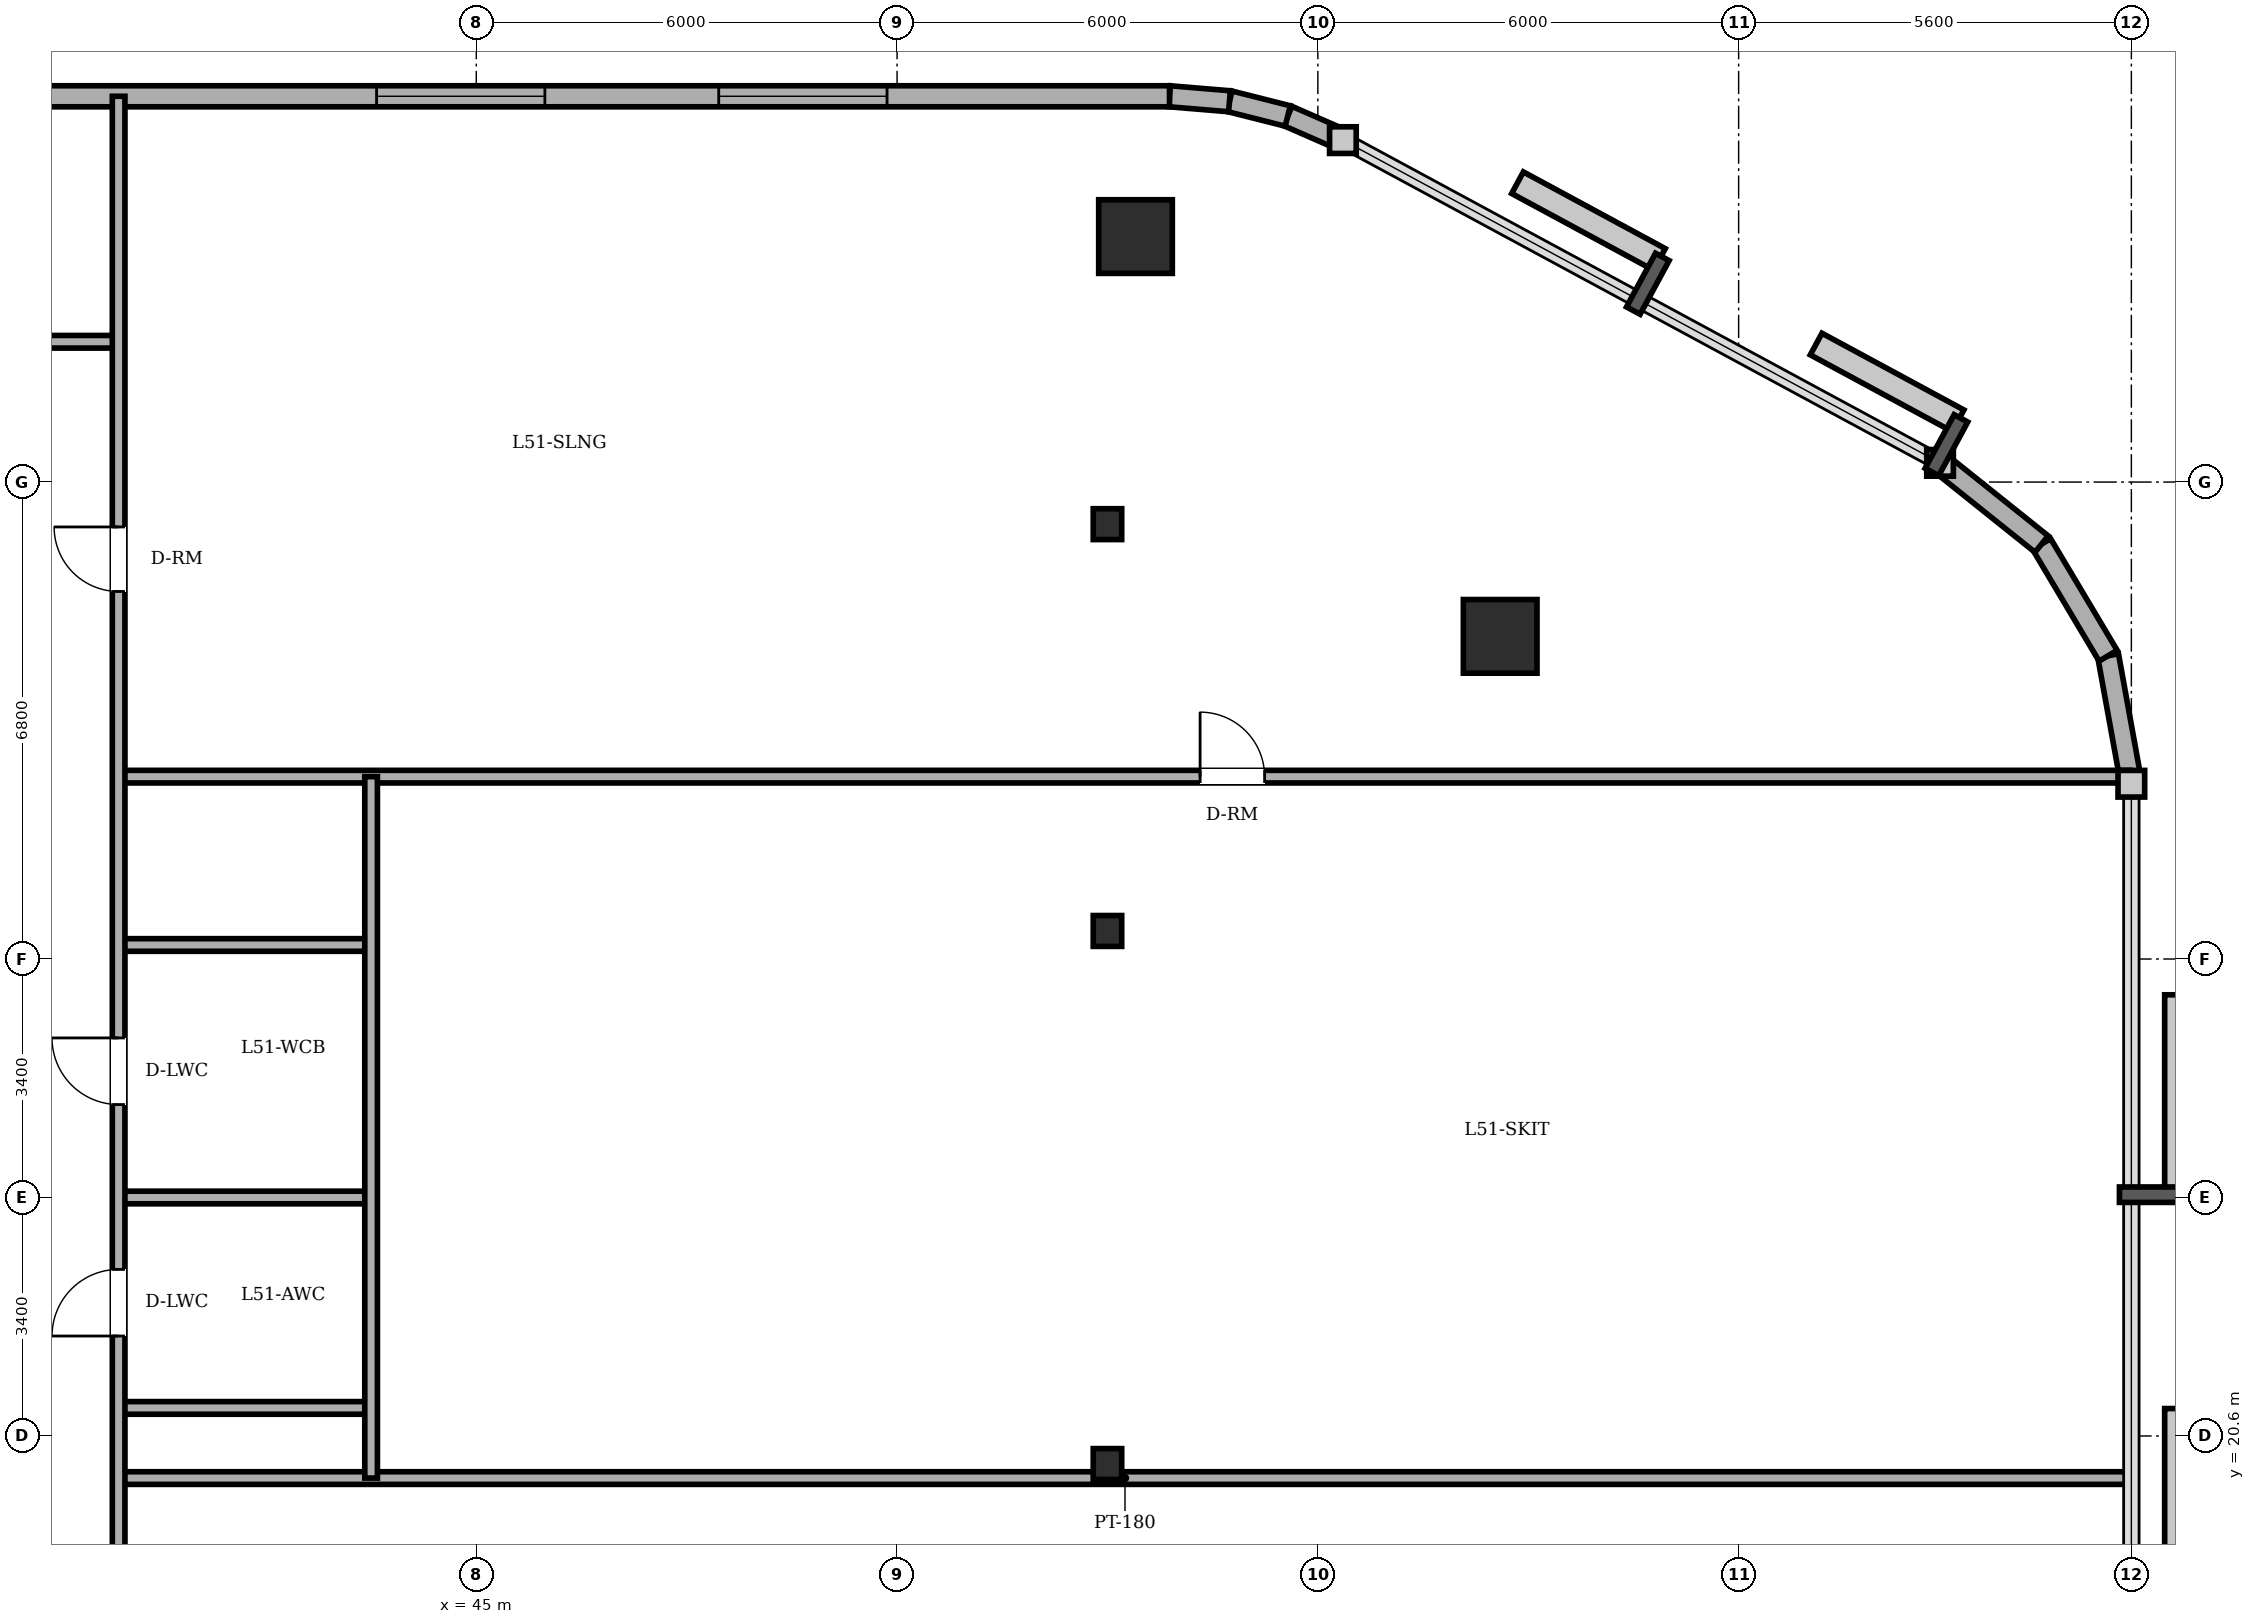
"""IFC4 building model, lengths in metres.
Left out: names, types, materials, properties, quantities, classifications, styles, units other than length and angle.
Written with IfcOpenShell. Run it as: python <this file> out.ifc"""

import sys

from ifc_helpers import new_model, si_unit, direction, frame, frame_2d, origin, origin_2d, place, context, subcontext, project, spatial, rectangle, circle, i_section, extrude, element, fill, save


model = new_model("IFC4")
c1 = context("Model", 3, precision=1e-05, world=origin(), true_north=direction((0.0, 1.0)))
c2 = subcontext(c1, "Body", "Model", "MODEL_VIEW")
j1 = project(units=[si_unit("LENGTHUNIT", "METRE"), si_unit("PLANEANGLEUNIT", "RADIAN")], contexts=[c1])
p1 = place(None, origin())
s1 = spatial("IfcSite", under=j1, at=p1, CompositionType="ELEMENT")
p2 = place(p1, origin())
s2 = spatial("IfcBuilding", under=s1, at=p2, CompositionType="ELEMENT")
p3 = place(p2, frame((0.0, 0.0, 196.2)))
s3 = spatial("IfcBuildingStorey", under=s2, at=p3, CompositionType="ELEMENT", Elevation=196.2)
for number, where, z_axis, x_axis in (
    (1, (59.6, 32.0, 0.0), (0.0, 0.0, 1.0), (1.0, 0.0, 0.0)),
    (2, (54.4, 37.7, 0.0), (0.0, 0.0, 1.0), (1.0, 0.0, 0.0)),
):
    element("IfcColumn", number, at=place(p3, frame(where, z_axis=z_axis, x_axis=x_axis)), inside=s3, PredefinedType="COLUMN", context=c2, shape_type="SweptSolid", body=[
        extrude(circle(Radius=0.525, at=origin_2d()), origin(), (0.0, 0.0, 1.0), 5.1),
    ])
for number, where, z_axis, x_axis in (
    (3, (54.0, 20.2, 0.0), (0.0, 0.0, 1.0), (1.0, 0.0, 0.0)),
    (4, (54.0, 27.8, 0.0), (0.0, 0.0, 1.0), (1.0, 0.0, 0.0)),
    (5, (54.0, 33.6, 0.0), (0.0, 0.0, 1.0), (1.0, 0.0, 0.0)),
):
    element("IfcColumn", number, at=place(p3, frame(where, z_axis=z_axis, x_axis=x_axis)), inside=s3, PredefinedType="COLUMN", context=c2, shape_type="SweptSolid", body=[
        extrude(i_section(OverallWidth=0.406, OverallDepth=0.44, WebThickness=0.024, FlangeThickness=0.039, FilletRadius=0.015, at=origin_2d()), origin(), (0.0, 0.0, 1.0), 5.1),
    ])
p4 = place(p3, frame((68.6, 29.899, 0.0), z_axis=(0.0, 0.0, 1.0), x_axis=(-0.178468469252, 0.983945631365, 0.0)))
e6 = element("IfcWall", 6, at=p4, inside=s3, PredefinedType="SOLIDWALL", context=c2, shape_type="SweptSolid", body=[
    extrude(rectangle(XDim=1.855, YDim=0.3, at=frame_2d((0.927, 0.0))), origin(), (0.0, 0.0, 1.0), 4.9),
])
p5 = place(p3, frame((68.269, 31.724, 0.0), z_axis=(0.0, 0.0, 1.0), x_axis=(-0.512072018927, 0.858942516955, 0.0)))
e7 = element("IfcWall", 7, at=p5, inside=s3, PredefinedType="SOLIDWALL", context=c2, shape_type="SweptSolid", body=[
    extrude(rectangle(XDim=1.853, YDim=0.3, at=frame_2d((0.927, 0.0))), origin(), (0.0, 0.0, 1.0), 4.9),
])
p6 = place(p3, frame((67.32, 33.316, 0.0), z_axis=(0.0, 0.0, 1.0), x_axis=(-0.780920189257, 0.624630817372, 0.0)))
e8 = element("IfcWall", 8, at=p6, inside=s3, PredefinedType="SOLIDWALL", context=c2, shape_type="SweptSolid", body=[
    extrude(rectangle(XDim=1.854, YDim=0.3, at=frame_2d((0.927, 0.0))), origin(), (0.0, 0.0, 1.0), 4.9),
])
p7 = place(p3, frame((57.357, 39.075, 0.0), z_axis=(0.0, 0.0, 1.0), x_axis=(-0.916085473636, 0.400983048261, 0.0)))
e9 = element("IfcWall", 9, at=p7, inside=s3, PredefinedType="SOLIDWALL", context=c2, shape_type="SweptSolid", body=[
    extrude(rectangle(XDim=0.858, YDim=0.3, at=frame_2d((0.429, 0.0))), origin(), (0.0, 0.0, 1.0), 4.9),
])
p8 = place(p3, frame((56.571, 39.419, 0.0), z_axis=(0.0, 0.0, 1.0), x_axis=(-0.969536346338, 0.244947490555, 0.0)))
e10 = element("IfcWall", 10, at=p8, inside=s3, PredefinedType="SOLIDWALL", context=c2, shape_type="SweptSolid", body=[
    extrude(rectangle(XDim=0.857, YDim=0.3, at=frame_2d((0.429, 0.0))), origin(), (0.0, 0.0, 1.0), 4.9),
])
p9 = place(p3, frame((55.74, 39.629, 0.0), z_axis=(0.0, 0.0, 1.0), x_axis=(-0.996565355958, 0.082809971041, 0.0)))
e11 = element("IfcWall", 11, at=p9, inside=s3, PredefinedType="SOLIDWALL", context=c2, shape_type="SweptSolid", body=[
    extrude(rectangle(XDim=0.858, YDim=0.3, at=frame_2d((0.429, 0.0))), origin(), (0.0, 0.0, 1.0), 4.9),
])
p10 = place(p3, frame((54.885, 39.7, 0.0), z_axis=(0.0, 0.0, 1.0), x_axis=(-1.0, 0.0, 0.0)))
e12 = element("IfcWall", 12, at=p10, inside=s3, PredefinedType="SOLIDWALL", context=c2, shape_type="SweptSolid", body=[
    extrude(rectangle(XDim=32.485, YDim=0.3, at=frame_2d((16.243, 0.0))), origin(), (0.0, 0.0, 1.0), 4.9),
])
p11 = place(p10, frame((23.36, 0.0, 0.0)))
e13 = element("IfcOpeningElement", 13, at=p11, cuts=e12, PredefinedType="OPENING", context=c2, shape_type="SweptSolid", body=[
    extrude(rectangle(XDim=0.95, YDim=2.2, at=frame_2d((0.475, 1.1))), frame((0.0, 0.16, 0.0), z_axis=(0.0, -1.0, 0.0), x_axis=(1.0, 0.0, 0.0)), (0.0, 0.0, 1.0), 0.32),
])
p12 = place(p10, frame((4.028, 0.0, 0.85)))
e14 = element("IfcOpeningElement", 14, at=p12, cuts=e12, PredefinedType="OPENING", context=c2, shape_type="SweptSolid", body=[
    extrude(rectangle(XDim=2.4, YDim=2.1, at=frame_2d((1.2, 1.05))), frame((0.0, 0.16, 0.0), z_axis=(0.0, -1.0, 0.0), x_axis=(1.0, 0.0, 0.0)), (0.0, 0.0, 1.0), 0.32),
])
p13 = place(p10, frame((8.907, 0.0, 0.85)))
e15 = element("IfcOpeningElement", 15, at=p13, cuts=e12, PredefinedType="OPENING", context=c2, shape_type="SweptSolid", body=[
    extrude(rectangle(XDim=2.4, YDim=2.1, at=frame_2d((1.2, 1.05))), frame((0.0, 0.16, 0.0), z_axis=(0.0, -1.0, 0.0), x_axis=(1.0, 0.0, 0.0)), (0.0, 0.0, 1.0), 0.32),
])
p14 = place(p10, frame((19.502, 0.0, 0.85)))
e16 = element("IfcOpeningElement", 16, at=p14, cuts=e12, PredefinedType="OPENING", context=c2, shape_type="SweptSolid", body=[
    extrude(rectangle(XDim=2.4, YDim=2.1, at=frame_2d((1.2, 1.05))), frame((0.0, 0.16, 0.0), z_axis=(0.0, -1.0, 0.0), x_axis=(1.0, 0.0, 0.0)), (0.0, 0.0, 1.0), 0.32),
])
p15 = place(p10, frame((25.218, 0.0, 0.85)))
e17 = element("IfcOpeningElement", 17, at=p15, cuts=e12, PredefinedType="OPENING", context=c2, shape_type="SweptSolid", body=[
    extrude(rectangle(XDim=2.4, YDim=2.1, at=frame_2d((1.2, 1.05))), frame((0.0, 0.16, 0.0), z_axis=(0.0, -1.0, 0.0), x_axis=(1.0, 0.0, 0.0)), (0.0, 0.0, 1.0), 0.32),
])
p16 = place(p3, frame((39.9, 20.0, 0.0), z_axis=(0.0, 0.0, 1.0), x_axis=(1.0, 0.0, 0.0)))
e18 = element("IfcWall", 18, at=p16, inside=s3, PredefinedType="PARTITIONING", context=c2, shape_type="SweptSolid", body=[
    extrude(rectangle(XDim=28.7, YDim=0.18, at=frame_2d((14.35, 0.0))), origin(), (0.0, 0.0, 1.0), 4.482),
])
p17 = place(p3, frame((39.9, 21.0, 0.0), z_axis=(0.0, 0.0, 1.0), x_axis=(1.0, 0.0, 0.0)))
e19 = element("IfcWall", 19, at=p17, inside=s3, PredefinedType="PARTITIONING", context=c2, shape_type="SweptSolid", body=[
    extrude(rectangle(XDim=3.6, YDim=0.18, at=frame_2d((1.8, 0.0))), origin(), (0.0, 0.0, 1.0), 4.9),
])
p18 = place(p3, frame((39.9, 24.0, 0.0), z_axis=(0.0, 0.0, 1.0), x_axis=(1.0, 0.0, 0.0)))
e20 = element("IfcWall", 20, at=p18, inside=s3, PredefinedType="PARTITIONING", context=c2, shape_type="SweptSolid", body=[
    extrude(rectangle(XDim=3.6, YDim=0.18, at=frame_2d((1.8, 0.0))), origin(), (0.0, 0.0, 1.0), 4.682),
])
p19 = place(p3, frame((39.9, 27.6, 0.0), z_axis=(0.0, 0.0, 1.0), x_axis=(1.0, 0.0, 0.0)))
e21 = element("IfcWall", 21, at=p19, inside=s3, PredefinedType="PARTITIONING", context=c2, shape_type="SweptSolid", body=[
    extrude(rectangle(XDim=3.6, YDim=0.18, at=frame_2d((1.8, 0.0))), origin(), (0.0, 0.0, 1.0), 4.482),
])
p20 = place(p3, frame((39.9, 30.0, 0.0), z_axis=(0.0, 0.0, 1.0), x_axis=(1.0, 0.0, 0.0)))
e22 = element("IfcWall", 22, at=p20, inside=s3, PredefinedType="PARTITIONING", context=c2, shape_type="SweptSolid", body=[
    extrude(rectangle(XDim=28.682, YDim=0.18, at=frame_2d((14.341, 0.0))), origin(), (0.0, 0.0, 1.0), 4.9),
])
p21 = place(p20, frame((15.421, 0.0, 0.0)))
e23 = element("IfcOpeningElement", 23, at=p21, cuts=e22, PredefinedType="OPENING", context=c2, shape_type="SweptSolid", body=[
    extrude(rectangle(XDim=0.92, YDim=2.1, at=frame_2d((0.46, 1.05))), frame((0.0, 0.1, 0.0), z_axis=(0.0, -1.0, 0.0), x_axis=(1.0, 0.0, 0.0)), (0.0, 0.0, 1.0), 0.2),
])
p22 = place(p3, frame((17.656, 36.2, 0.0), z_axis=(0.0, 0.0, 1.0), x_axis=(1.0, 0.0, 0.0)))
e24 = element("IfcWall", 24, at=p22, inside=s3, PredefinedType="PARTITIONING", context=c2, shape_type="SweptSolid", body=[
    extrude(rectangle(XDim=22.244, YDim=0.18, at=frame_2d((11.122, 0.0))), origin(), (0.0, 0.0, 1.0), 4.9),
])
p23 = place(p3, frame((39.9, 8.3, 0.0), z_axis=(0.0, 0.0, 1.0), x_axis=(0.0, 1.0, 0.0)))
e25 = element("IfcWall", 25, at=p23, inside=s3, PredefinedType="PARTITIONING", context=c2, shape_type="SweptSolid", body=[
    extrude(rectangle(XDim=31.4, YDim=0.18, at=frame_2d((15.7, 0.0))), origin(), (0.0, 0.0, 1.0), 4.9),
])
p24 = place(p23, frame((13.725, 0.0, 0.0)))
e26 = element("IfcOpeningElement", 26, at=p24, cuts=e25, PredefinedType="OPENING", context=c2, shape_type="SweptSolid", body=[
    extrude(rectangle(XDim=0.95, YDim=2.15, at=frame_2d((0.475, 1.075))), frame((0.0, 0.1, 0.0), z_axis=(0.0, -1.0, 0.0), x_axis=(1.0, 0.0, 0.0)), (0.0, 0.0, 1.0), 0.2),
])
p25 = place(p23, frame((17.025, 0.0, 0.0)))
e27 = element("IfcOpeningElement", 27, at=p25, cuts=e25, PredefinedType="OPENING", context=c2, shape_type="SweptSolid", body=[
    extrude(rectangle(XDim=0.95, YDim=2.15, at=frame_2d((0.475, 1.075))), frame((0.0, 0.1, 0.0), z_axis=(0.0, -1.0, 0.0), x_axis=(1.0, 0.0, 0.0)), (0.0, 0.0, 1.0), 0.2),
])
p26 = place(p23, frame((24.34, 0.0, 0.0)))
e28 = element("IfcOpeningElement", 28, at=p26, cuts=e25, PredefinedType="OPENING", context=c2, shape_type="SweptSolid", body=[
    extrude(rectangle(XDim=0.92, YDim=2.1, at=frame_2d((0.46, 1.05))), frame((0.0, 0.1, 0.0), z_axis=(0.0, -1.0, 0.0), x_axis=(1.0, 0.0, 0.0)), (0.0, 0.0, 1.0), 0.2),
])
p27 = place(p23, frame((7.14, 0.0, 0.0)))
e29 = element("IfcOpeningElement", 29, at=p27, cuts=e25, PredefinedType="OPENING", context=c2, shape_type="SweptSolid", body=[
    extrude(rectangle(XDim=0.92, YDim=2.1, at=frame_2d((0.46, 1.05))), frame((0.0, 0.1, 0.0), z_axis=(0.0, -1.0, 0.0), x_axis=(1.0, 0.0, 0.0)), (0.0, 0.0, 1.0), 0.2),
])
p28 = place(p3, frame((43.5, 20.0, 0.0), z_axis=(0.0, 0.0, 1.0), x_axis=(0.0, 1.0, 0.0)))
e30 = element("IfcWall", 30, at=p28, inside=s3, PredefinedType="PARTITIONING", context=c2, shape_type="SweptSolid", body=[
    extrude(rectangle(XDim=10.0, YDim=0.18, at=frame_2d((5.0, 0.0))), origin(), (0.0, 0.0, 1.0), 4.9),
])
p29 = place(p12, origin())
e31 = element("IfcWindow", 31, at=p29, inside=s3, PartitioningType="TRIPLE_PANEL_VERTICAL", PredefinedType="WINDOW", context=c2, shape_type="SweptSolid", body=[
    extrude(rectangle(XDim=2.4, YDim=2.1, at=frame_2d((1.2, 1.05))), frame((0.0, 0.03, 0.0), z_axis=(0.0, -1.0, 0.0), x_axis=(1.0, 0.0, 0.0)), (0.0, 0.0, 1.0), 0.06),
])
fill(e14, e31)
p30 = place(p13, origin())
e32 = element("IfcWindow", 32, at=p30, inside=s3, PartitioningType="TRIPLE_PANEL_VERTICAL", PredefinedType="WINDOW", context=c2, shape_type="SweptSolid", body=[
    extrude(rectangle(XDim=2.4, YDim=2.1, at=frame_2d((1.2, 1.05))), frame((0.0, 0.03, 0.0), z_axis=(0.0, -1.0, 0.0), x_axis=(1.0, 0.0, 0.0)), (0.0, 0.0, 1.0), 0.06),
])
fill(e15, e32)
p31 = place(p24, origin())
e33 = element("IfcDoor", 33, at=p31, inside=s3, OperationType="SINGLE_SWING_LEFT", PredefinedType="DOOR", context=c2, shape_type="SweptSolid", body=[
    extrude(rectangle(XDim=0.95, YDim=2.15, at=frame_2d((0.475, 1.075))), frame((0.0, 0.025, 0.0), z_axis=(0.0, -1.0, 0.0), x_axis=(1.0, 0.0, 0.0)), (0.0, 0.0, 1.0), 0.05),
])
fill(e26, e33)
p32 = place(p25, origin())
e34 = element("IfcDoor", 34, at=p32, inside=s3, OperationType="SINGLE_SWING_RIGHT", PredefinedType="DOOR", context=c2, shape_type="SweptSolid", body=[
    extrude(rectangle(XDim=0.95, YDim=2.15, at=frame_2d((0.475, 1.075))), frame((0.0, 0.025, 0.0), z_axis=(0.0, -1.0, 0.0), x_axis=(1.0, 0.0, 0.0)), (0.0, 0.0, 1.0), 0.05),
])
fill(e27, e34)
p33 = place(p26, origin())
e35 = element("IfcDoor", 35, at=p33, inside=s3, OperationType="SINGLE_SWING_RIGHT", PredefinedType="DOOR", context=c2, shape_type="SweptSolid", body=[
    extrude(rectangle(XDim=0.92, YDim=2.1, at=frame_2d((0.46, 1.05))), frame((0.0, 0.025, 0.0), z_axis=(0.0, -1.0, 0.0), x_axis=(1.0, 0.0, 0.0)), (0.0, 0.0, 1.0), 0.05),
])
fill(e28, e35)
p34 = place(p21, origin())
e36 = element("IfcDoor", 36, at=p34, inside=s3, OperationType="SINGLE_SWING_LEFT", PredefinedType="DOOR", context=c2, shape_type="SweptSolid", body=[
    extrude(rectangle(XDim=0.92, YDim=2.1, at=frame_2d((0.46, 1.05))), frame((0.0, 0.025, 0.0), z_axis=(0.0, -1.0, 0.0), x_axis=(1.0, 0.0, 0.0)), (0.0, 0.0, 1.0), 0.05),
])
fill(e23, e36)
save(model, sys.argv[1])
